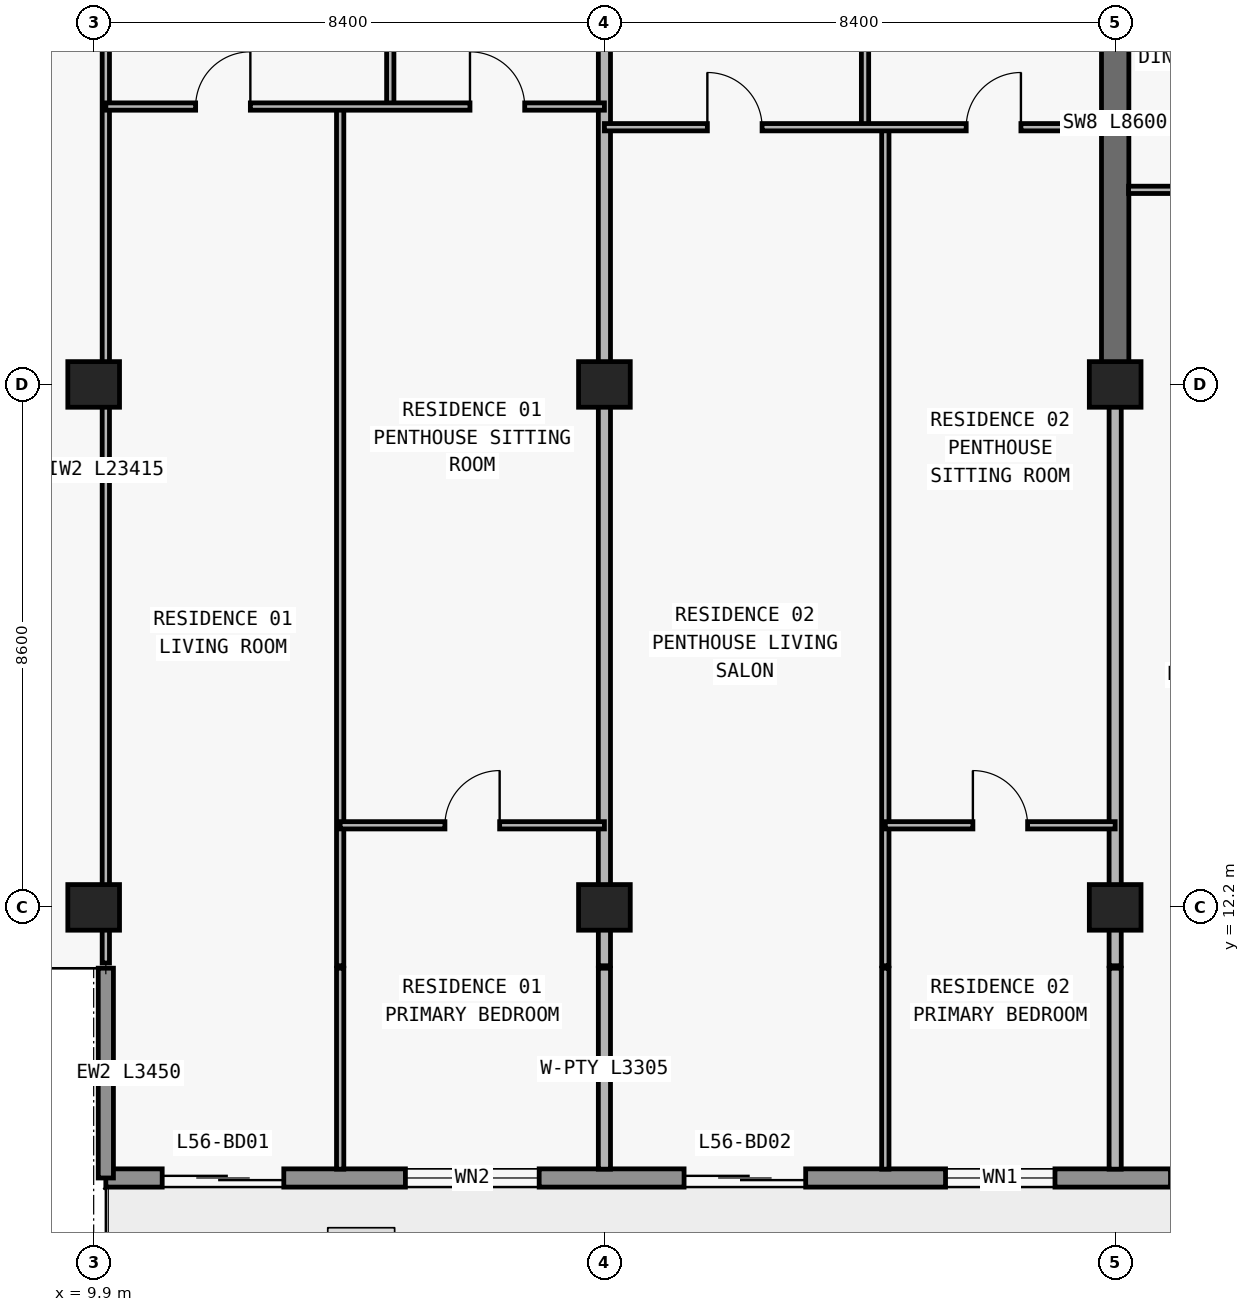
"""IFC4 building model, lengths in metres.
Left out: names, types, materials, properties, quantities, classifications, styles, units other than length and angle.
Written with IfcOpenShell. Run it as: python <this file> out.ifc"""

import sys

from ifc_helpers import new_model, si_unit, direction, frame, frame_2d, origin, origin_2d, place, context, subcontext, project, spatial, rectangle, extrude, element, fill, save


model = new_model("IFC4")
c1 = context("Model", 3, precision=1e-05, world=origin(), true_north=direction((0.0, 1.0)))
c2 = subcontext(c1, "Body", "Model", "MODEL_VIEW")
j1 = project(units=[si_unit("LENGTHUNIT", "METRE"), si_unit("PLANEANGLEUNIT", "RADIAN")], contexts=[c1])
p1 = place(None, origin())
s1 = spatial("IfcSite", under=j1, at=p1, CompositionType="ELEMENT")
p2 = place(p1, origin())
s2 = spatial("IfcBuilding", under=s1, at=p2, CompositionType="ELEMENT")
p3 = place(p2, frame((0.0, 0.0, 201.6)))
s3 = spatial("IfcBuildingStorey", under=s2, at=p3, CompositionType="ELEMENT", Elevation=201.6)
for number, where, z_axis, x_axis in (
    (1, (9.9, 12.2, 0.0), (0.0, 0.0, 1.0), (1.0, 0.0, 0.0)),
    (2, (18.3, 12.2, 0.0), (0.0, 0.0, 1.0), (1.0, 0.0, 0.0)),
    (3, (26.7, 12.2, 0.0), (0.0, 0.0, 1.0), (1.0, 0.0, 0.0)),
    (4, (9.9, 20.8, 0.0), (0.0, 0.0, 1.0), (1.0, 0.0, 0.0)),
    (5, (18.3, 20.8, 0.0), (0.0, 0.0, 1.0), (1.0, 0.0, 0.0)),
    (6, (26.7, 20.8, 0.0), (0.0, 0.0, 1.0), (1.0, 0.0, 0.0)),
):
    element("IfcColumn", number, at=place(p3, frame(where, z_axis=z_axis, x_axis=x_axis)), inside=s3, PredefinedType="COLUMN", context=c2, shape_type="SweptSolid", body=[
        extrude(rectangle(XDim=0.85, YDim=0.75, at=origin_2d()), origin(), (0.0, 0.0, 1.0), 3.05),
    ])
p4 = place(p3, frame((26.7, 20.8, 0.0), z_axis=(0.0, 0.0, 1.0), x_axis=(0.0, 1.0, 0.0)))
e7 = element("IfcWall", 7, at=p4, inside=s3, PredefinedType="SHEAR", context=c2, shape_type="SweptSolid", body=[
    extrude(rectangle(XDim=8.6, YDim=0.45, at=frame_2d((4.3, 0.0))), origin(), (0.0, 0.0, 1.0), 3.05),
])
p5 = place(p3, frame((67.7, 7.75, 0.0), z_axis=(0.0, 0.0, 1.0), x_axis=(-1.0, 0.0, 0.0)))
e8 = element("IfcWall", 8, at=p5, inside=s3, PredefinedType="STANDARD", context=c2, shape_type="SweptSolid", body=[
    extrude(rectangle(XDim=57.6, YDim=0.3, at=frame_2d((28.8, 0.0))), origin(), (0.0, 0.0, 1.0), 3.05),
])
p6 = place(p5, frame((54.673, 0.0, 0.0)))
e9 = element("IfcOpeningElement", 9, at=p6, cuts=e8, PredefinedType="OPENING", context=c2, shape_type="SweptSolid", body=[
    extrude(rectangle(XDim=2.0, YDim=2.3, at=frame_2d((1.0, 1.15))), frame((0.0, 0.16, 0.0), z_axis=(0.0, -1.0, 0.0), x_axis=(1.0, 0.0, 0.0)), (0.0, 0.0, 1.0), 0.32),
])
p7 = place(p5, frame((50.473, 0.0, 0.85)))
e10 = element("IfcOpeningElement", 10, at=p7, cuts=e8, PredefinedType="OPENING", context=c2, shape_type="SweptSolid", body=[
    extrude(rectangle(XDim=2.2, YDim=1.55, at=frame_2d((1.1, 0.775))), frame((0.0, 0.16, 0.0), z_axis=(0.0, -1.0, 0.0), x_axis=(1.0, 0.0, 0.0)), (0.0, 0.0, 1.0), 0.32),
])
p8 = place(p5, frame((46.09, 0.0, 0.0)))
e11 = element("IfcOpeningElement", 11, at=p8, cuts=e8, PredefinedType="OPENING", context=c2, shape_type="SweptSolid", body=[
    extrude(rectangle(XDim=2.0, YDim=2.3, at=frame_2d((1.0, 1.15))), frame((0.0, 0.16, 0.0), z_axis=(0.0, -1.0, 0.0), x_axis=(1.0, 0.0, 0.0)), (0.0, 0.0, 1.0), 0.32),
])
p9 = place(p5, frame((41.99, 0.0, 0.85)))
e12 = element("IfcOpeningElement", 12, at=p9, cuts=e8, PredefinedType="OPENING", context=c2, shape_type="SweptSolid", body=[
    extrude(rectangle(XDim=1.8, YDim=1.55, at=frame_2d((0.9, 0.775))), frame((0.0, 0.16, 0.0), z_axis=(0.0, -1.0, 0.0), x_axis=(1.0, 0.0, 0.0)), (0.0, 0.0, 1.0), 0.32),
])
p10 = place(p5, frame((38.09, 0.0, 0.0)))
e13 = element("IfcOpeningElement", 13, at=p10, cuts=e8, PredefinedType="OPENING", context=c2, shape_type="SweptSolid", body=[
    extrude(rectangle(XDim=2.0, YDim=2.3, at=frame_2d((1.0, 1.15))), frame((0.0, 0.16, 0.0), z_axis=(0.0, -1.0, 0.0), x_axis=(1.0, 0.0, 0.0)), (0.0, 0.0, 1.0), 0.32),
])
p11 = place(p5, frame((33.41, 0.0, 0.65)))
e14 = element("IfcOpeningElement", 14, at=p11, cuts=e8, PredefinedType="OPENING", context=c2, shape_type="SweptSolid", body=[
    extrude(rectangle(XDim=2.6, YDim=1.85, at=frame_2d((1.3, 0.925))), frame((0.0, 0.16, 0.0), z_axis=(0.0, -1.0, 0.0), x_axis=(1.0, 0.0, 0.0)), (0.0, 0.0, 1.0), 0.32),
])
p12 = place(p5, frame((27.7, 0.0, 0.85)))
e15 = element("IfcOpeningElement", 15, at=p12, cuts=e8, PredefinedType="OPENING", context=c2, shape_type="SweptSolid", body=[
    extrude(rectangle(XDim=2.2, YDim=1.55, at=frame_2d((1.1, 0.775))), frame((0.0, 0.16, 0.0), z_axis=(0.0, -1.0, 0.0), x_axis=(1.0, 0.0, 0.0)), (0.0, 0.0, 1.0), 0.32),
])
p13 = place(p5, frame((19.7, 0.0, 0.85)))
e16 = element("IfcOpeningElement", 16, at=p13, cuts=e8, PredefinedType="OPENING", context=c2, shape_type="SweptSolid", body=[
    extrude(rectangle(XDim=2.2, YDim=1.55, at=frame_2d((1.1, 0.775))), frame((0.0, 0.16, 0.0), z_axis=(0.0, -1.0, 0.0), x_axis=(1.0, 0.0, 0.0)), (0.0, 0.0, 1.0), 0.32),
])
p14 = place(p5, frame((13.69, 0.0, 0.0)))
e17 = element("IfcOpeningElement", 17, at=p14, cuts=e8, PredefinedType="OPENING", context=c2, shape_type="SweptSolid", body=[
    extrude(rectangle(XDim=2.0, YDim=2.3, at=frame_2d((1.0, 1.15))), frame((0.0, 0.16, 0.0), z_axis=(0.0, -1.0, 0.0), x_axis=(1.0, 0.0, 0.0)), (0.0, 0.0, 1.0), 0.32),
])
p15 = place(p5, frame((9.01, 0.0, 0.65)))
e18 = element("IfcOpeningElement", 18, at=p15, cuts=e8, PredefinedType="OPENING", context=c2, shape_type="SweptSolid", body=[
    extrude(rectangle(XDim=2.6, YDim=1.85, at=frame_2d((1.3, 0.925))), frame((0.0, 0.16, 0.0), z_axis=(0.0, -1.0, 0.0), x_axis=(1.0, 0.0, 0.0)), (0.0, 0.0, 1.0), 0.32),
])
p16 = place(p5, frame((3.0, 0.0, 0.85)))
e19 = element("IfcOpeningElement", 19, at=p16, cuts=e8, PredefinedType="OPENING", context=c2, shape_type="SweptSolid", body=[
    extrude(rectangle(XDim=2.2, YDim=1.55, at=frame_2d((1.1, 0.775))), frame((0.0, 0.16, 0.0), z_axis=(0.0, -1.0, 0.0), x_axis=(1.0, 0.0, 0.0)), (0.0, 0.0, 1.0), 0.32),
])
p17 = place(p3, frame((10.1, 11.2, 0.0), z_axis=(0.0, 0.0, 1.0), x_axis=(0.0, -1.0, 0.0)))
e20 = element("IfcWall", 20, at=p17, inside=s3, PredefinedType="ELEMENTEDWALL", context=c2, shape_type="SweptSolid", body=[
    extrude(rectangle(XDim=3.45, YDim=0.25, at=frame_2d((1.725, 0.0))), origin(), (0.0, 0.0, 1.0), 3.05),
])
p18 = place(p3, frame((10.1, 11.285, 0.0), z_axis=(0.0, 0.0, 1.0), x_axis=(0.0, 1.0, 0.0)))
e21 = element("IfcWall", 21, at=p18, inside=s3, PredefinedType="PARTITIONING", context=c2, shape_type="SweptSolid", body=[
    extrude(rectangle(XDim=23.415, YDim=0.12, at=frame_2d((11.708, 0.0))), origin(), (0.0, 0.0, 1.0), 2.263),
])
p19 = place(p18, frame((16.21, 0.0, 0.0)))
e22 = element("IfcOpeningElement", 22, at=p19, cuts=e21, PredefinedType="OPENING", context=c2, shape_type="SweptSolid", body=[
    extrude(rectangle(XDim=0.9, YDim=2.15, at=frame_2d((0.45, 1.075))), frame((0.0, 0.07, 0.0), z_axis=(0.0, -1.0, 0.0), x_axis=(1.0, 0.0, 0.0)), (0.0, 0.0, 1.0), 0.14),
])
p20 = place(p3, frame((13.954, 7.895, 0.0), z_axis=(0.0, 0.0, 1.0), x_axis=(0.0, 1.0, 0.0)))
e23 = element("IfcWall", 23, at=p20, inside=s3, PredefinedType="PARTITIONING", context=c2, shape_type="SweptSolid", body=[
    extrude(rectangle(XDim=3.305, YDim=0.12, at=frame_2d((1.652, 0.0))), origin(), (0.0, 0.0, 1.0), 3.05),
])
p21 = place(p3, frame((13.954, 11.24, 0.0), z_axis=(0.0, 0.0, 1.0), x_axis=(0.0, 1.0, 0.0)))
e24 = element("IfcWall", 24, at=p21, inside=s3, PredefinedType="PARTITIONING", context=c2, shape_type="SweptSolid", body=[
    extrude(rectangle(XDim=14.13, YDim=0.12, at=frame_2d((7.065, 0.0))), origin(), (0.0, 0.0, 1.0), 3.05),
])
p22 = place(p3, frame((14.778, 25.37, 0.0), z_axis=(0.0, 0.0, 1.0), x_axis=(0.0, 1.0, 0.0)))
e25 = element("IfcWall", 25, at=p22, inside=s3, PredefinedType="PARTITIONING", context=c2, shape_type="SweptSolid", body=[
    extrude(rectangle(XDim=5.15, YDim=0.12, at=frame_2d((2.575, 0.0))), origin(), (0.0, 0.0, 1.0), 3.05),
])
p23 = place(p22, frame((2.125, 0.0, 0.0)))
e26 = element("IfcOpeningElement", 26, at=p23, cuts=e25, PredefinedType="OPENING", context=c2, shape_type="SweptSolid", body=[
    extrude(rectangle(XDim=0.9, YDim=2.15, at=frame_2d((0.45, 1.075))), frame((0.0, 0.07, 0.0), z_axis=(0.0, -1.0, 0.0), x_axis=(1.0, 0.0, 0.0)), (0.0, 0.0, 1.0), 0.14),
])
p24 = place(p3, frame((18.3, 7.895, 0.0), z_axis=(0.0, 0.0, 1.0), x_axis=(0.0, 1.0, 0.0)))
e27 = element("IfcWall", 27, at=p24, inside=s3, PredefinedType="PARTITIONING", context=c2, shape_type="SweptSolid", body=[
    extrude(rectangle(XDim=3.305, YDim=0.2, at=frame_2d((1.652, 0.0))), origin(), (0.0, 0.0, 1.0), 3.05),
])
p25 = place(p3, frame((18.3, 11.24, 0.0), z_axis=(0.0, 0.0, 1.0), x_axis=(0.0, 1.0, 0.0)))
e28 = element("IfcWall", 28, at=p25, inside=s3, PredefinedType="PARTITIONING", context=c2, shape_type="SweptSolid", body=[
    extrude(rectangle(XDim=23.46, YDim=0.2, at=frame_2d((11.73, 0.0))), origin(), (0.0, 0.0, 1.0), 2.263),
])
p26 = place(p3, frame((22.586, 25.03, 0.0), z_axis=(0.0, 0.0, 1.0), x_axis=(0.0, 1.0, 0.0)))
e29 = element("IfcWall", 29, at=p26, inside=s3, PredefinedType="PARTITIONING", context=c2, shape_type="SweptSolid", body=[
    extrude(rectangle(XDim=5.15, YDim=0.12, at=frame_2d((2.575, 0.0))), origin(), (0.0, 0.0, 1.0), 2.725),
])
p27 = place(p26, frame((2.125, 0.0, 0.0)))
e30 = element("IfcOpeningElement", 30, at=p27, cuts=e29, PredefinedType="OPENING", context=c2, shape_type="SweptSolid", body=[
    extrude(rectangle(XDim=0.9, YDim=2.15, at=frame_2d((0.45, 1.075))), frame((0.0, 0.07, 0.0), z_axis=(0.0, -1.0, 0.0), x_axis=(1.0, 0.0, 0.0)), (0.0, 0.0, 1.0), 0.14),
])
p28 = place(p3, frame((22.92, 7.895, 0.0), z_axis=(0.0, 0.0, 1.0), x_axis=(0.0, 1.0, 0.0)))
e31 = element("IfcWall", 31, at=p28, inside=s3, PredefinedType="PARTITIONING", context=c2, shape_type="SweptSolid", body=[
    extrude(rectangle(XDim=3.305, YDim=0.12, at=frame_2d((1.652, 0.0))), origin(), (0.0, 0.0, 1.0), 3.05),
])
p29 = place(p3, frame((22.92, 11.24, 0.0), z_axis=(0.0, 0.0, 1.0), x_axis=(0.0, 1.0, 0.0)))
e32 = element("IfcWall", 32, at=p29, inside=s3, PredefinedType="PARTITIONING", context=c2, shape_type="SweptSolid", body=[
    extrude(rectangle(XDim=13.79, YDim=0.12, at=frame_2d((6.895, 0.0))), origin(), (0.0, 0.0, 1.0), 3.05),
])
p30 = place(p3, frame((26.7, 7.895, 0.0), z_axis=(0.0, 0.0, 1.0), x_axis=(0.0, 1.0, 0.0)))
e33 = element("IfcWall", 33, at=p30, inside=s3, PredefinedType="PARTITIONING", context=c2, shape_type="SweptSolid", body=[
    extrude(rectangle(XDim=3.305, YDim=0.2, at=frame_2d((1.652, 0.0))), origin(), (0.0, 0.0, 1.0), 3.05),
])
p31 = place(p3, frame((26.7, 11.24, 0.0), z_axis=(0.0, 0.0, 1.0), x_axis=(0.0, 1.0, 0.0)))
e34 = element("IfcWall", 34, at=p31, inside=s3, PredefinedType="PARTITIONING", context=c2, shape_type="SweptSolid", body=[
    extrude(rectangle(XDim=9.555, YDim=0.2, at=frame_2d((4.777, 0.0))), origin(), (0.0, 0.0, 1.0), 2.263),
])
p32 = place(p3, frame((13.954, 13.55, 0.0), z_axis=(0.0, 0.0, 1.0), x_axis=(1.0, 0.0, 0.0)))
e35 = element("IfcWall", 35, at=p32, inside=s3, PredefinedType="PARTITIONING", context=c2, shape_type="SweptSolid", body=[
    extrude(rectangle(XDim=4.346, YDim=0.12, at=frame_2d((2.173, 0.0))), origin(), (0.0, 0.0, 1.0), 3.05),
])
p33 = place(p32, frame((1.723, 0.0, 0.0)))
e36 = element("IfcOpeningElement", 36, at=p33, cuts=e35, PredefinedType="OPENING", context=c2, shape_type="SweptSolid", body=[
    extrude(rectangle(XDim=0.9, YDim=2.15, at=frame_2d((0.45, 1.075))), frame((0.0, 0.07, 0.0), z_axis=(0.0, -1.0, 0.0), x_axis=(1.0, 0.0, 0.0)), (0.0, 0.0, 1.0), 0.14),
])
p34 = place(p3, frame((22.92, 13.55, 0.0), z_axis=(0.0, 0.0, 1.0), x_axis=(1.0, 0.0, 0.0)))
e37 = element("IfcWall", 37, at=p34, inside=s3, PredefinedType="PARTITIONING", context=c2, shape_type="SweptSolid", body=[
    extrude(rectangle(XDim=3.78, YDim=0.12, at=frame_2d((1.89, 0.0))), origin(), (0.0, 0.0, 1.0), 3.05),
])
p35 = place(p34, frame((1.44, 0.0, 0.0)))
e38 = element("IfcOpeningElement", 38, at=p35, cuts=e37, PredefinedType="OPENING", context=c2, shape_type="SweptSolid", body=[
    extrude(rectangle(XDim=0.9, YDim=2.15, at=frame_2d((0.45, 1.075))), frame((0.0, 0.07, 0.0), z_axis=(0.0, -1.0, 0.0), x_axis=(1.0, 0.0, 0.0)), (0.0, 0.0, 1.0), 0.14),
])
p36 = place(p3, frame((26.92, 24.0, 0.0), z_axis=(0.0, 0.0, 1.0), x_axis=(1.0, 0.0, 0.0)))
e39 = element("IfcWall", 39, at=p36, inside=s3, PredefinedType="PARTITIONING", context=c2, shape_type="SweptSolid", body=[
    extrude(rectangle(XDim=8.18, YDim=0.12, at=frame_2d((4.09, 0.0))), origin(), (0.0, 0.0, 1.0), 3.05),
])
p37 = place(p36, frame((1.33, 0.0, 0.0)))
e40 = element("IfcOpeningElement", 40, at=p37, cuts=e39, PredefinedType="OPENING", context=c2, shape_type="SweptSolid", body=[
    extrude(rectangle(XDim=0.9, YDim=2.15, at=frame_2d((0.45, 1.075))), frame((0.0, 0.07, 0.0), z_axis=(0.0, -1.0, 0.0), x_axis=(1.0, 0.0, 0.0)), (0.0, 0.0, 1.0), 0.14),
])
p38 = place(p3, frame((18.3, 25.03, 0.0), z_axis=(0.0, 0.0, 1.0), x_axis=(1.0, 0.0, 0.0)))
e41 = element("IfcWall", 41, at=p38, inside=s3, PredefinedType="PARTITIONING", context=c2, shape_type="SweptSolid", body=[
    extrude(rectangle(XDim=8.18, YDim=0.12, at=frame_2d((4.09, 0.0))), origin(), (0.0, 0.0, 1.0), 3.05),
])
p39 = place(p38, frame((1.693, 0.0, 0.0)))
e42 = element("IfcOpeningElement", 42, at=p39, cuts=e41, PredefinedType="OPENING", context=c2, shape_type="SweptSolid", body=[
    extrude(rectangle(XDim=0.9, YDim=2.15, at=frame_2d((0.45, 1.075))), frame((0.0, 0.07, 0.0), z_axis=(0.0, -1.0, 0.0), x_axis=(1.0, 0.0, 0.0)), (0.0, 0.0, 1.0), 0.14),
])
p40 = place(p38, frame((5.95, 0.0, 0.0)))
e43 = element("IfcOpeningElement", 43, at=p40, cuts=e41, PredefinedType="OPENING", context=c2, shape_type="SweptSolid", body=[
    extrude(rectangle(XDim=0.9, YDim=2.15, at=frame_2d((0.45, 1.075))), frame((0.0, 0.07, 0.0), z_axis=(0.0, -1.0, 0.0), x_axis=(1.0, 0.0, 0.0)), (0.0, 0.0, 1.0), 0.14),
])
p41 = place(p3, frame((10.1, 25.37, 0.0), z_axis=(0.0, 0.0, 1.0), x_axis=(1.0, 0.0, 0.0)))
e44 = element("IfcWall", 44, at=p41, inside=s3, PredefinedType="PARTITIONING", context=c2, shape_type="SweptSolid", body=[
    extrude(rectangle(XDim=8.2, YDim=0.12, at=frame_2d((4.1, 0.0))), origin(), (0.0, 0.0, 1.0), 3.05),
])
p42 = place(p41, frame((1.477, 0.0, 0.0)))
e45 = element("IfcOpeningElement", 45, at=p42, cuts=e44, PredefinedType="OPENING", context=c2, shape_type="SweptSolid", body=[
    extrude(rectangle(XDim=0.9, YDim=2.15, at=frame_2d((0.45, 1.075))), frame((0.0, 0.07, 0.0), z_axis=(0.0, -1.0, 0.0), x_axis=(1.0, 0.0, 0.0)), (0.0, 0.0, 1.0), 0.14),
])
p43 = place(p41, frame((5.989, 0.0, 0.0)))
e46 = element("IfcOpeningElement", 46, at=p43, cuts=e44, PredefinedType="OPENING", context=c2, shape_type="SweptSolid", body=[
    extrude(rectangle(XDim=0.9, YDim=2.15, at=frame_2d((0.45, 1.075))), frame((0.0, 0.07, 0.0), z_axis=(0.0, -1.0, 0.0), x_axis=(1.0, 0.0, 0.0)), (0.0, 0.0, 1.0), 0.14),
])
p44 = place(p6, origin())
e47 = element("IfcDoor", 47, at=p44, inside=s3, OperationType="DOUBLE_DOOR_SLIDING", PredefinedType="DOOR", context=c2, shape_type="SweptSolid", body=[
    extrude(rectangle(XDim=2.0, YDim=2.3, at=frame_2d((1.0, 1.15))), frame((0.0, 0.025, 0.0), z_axis=(0.0, -1.0, 0.0), x_axis=(1.0, 0.0, 0.0)), (0.0, 0.0, 1.0), 0.05),
])
fill(e9, e47)
p45 = place(p7, origin())
e48 = element("IfcWindow", 48, at=p45, inside=s3, PartitioningType="SINGLE_PANEL", PredefinedType="WINDOW", context=c2, shape_type="SweptSolid", body=[
    extrude(rectangle(XDim=2.2, YDim=1.55, at=frame_2d((1.1, 0.775))), frame((0.0, 0.03, 0.0), z_axis=(0.0, -1.0, 0.0), x_axis=(1.0, 0.0, 0.0)), (0.0, 0.0, 1.0), 0.06),
])
fill(e10, e48)
p46 = place(p8, origin())
e49 = element("IfcDoor", 49, at=p46, inside=s3, OperationType="DOUBLE_DOOR_SLIDING", PredefinedType="DOOR", context=c2, shape_type="SweptSolid", body=[
    extrude(rectangle(XDim=2.0, YDim=2.3, at=frame_2d((1.0, 1.15))), frame((0.0, 0.025, 0.0), z_axis=(0.0, -1.0, 0.0), x_axis=(1.0, 0.0, 0.0)), (0.0, 0.0, 1.0), 0.05),
])
fill(e11, e49)
p47 = place(p9, origin())
e50 = element("IfcWindow", 50, at=p47, inside=s3, PartitioningType="SINGLE_PANEL", PredefinedType="WINDOW", context=c2, shape_type="SweptSolid", body=[
    extrude(rectangle(XDim=1.8, YDim=1.55, at=frame_2d((0.9, 0.775))), frame((0.0, 0.03, 0.0), z_axis=(0.0, -1.0, 0.0), x_axis=(1.0, 0.0, 0.0)), (0.0, 0.0, 1.0), 0.06),
])
fill(e12, e50)
p48 = place(p42, origin())
e51 = element("IfcDoor", 51, at=p48, inside=s3, OperationType="SINGLE_SWING_RIGHT", PredefinedType="DOOR", context=c2, shape_type="SweptSolid", body=[
    extrude(rectangle(XDim=0.9, YDim=2.15, at=frame_2d((0.45, 1.075))), frame((0.0, 0.025, 0.0), z_axis=(0.0, -1.0, 0.0), x_axis=(1.0, 0.0, 0.0)), (0.0, 0.0, 1.0), 0.05),
])
fill(e45, e51)
p49 = place(p43, origin())
e52 = element("IfcDoor", 52, at=p49, inside=s3, OperationType="SINGLE_SWING_LEFT", PredefinedType="DOOR", context=c2, shape_type="SweptSolid", body=[
    extrude(rectangle(XDim=0.9, YDim=2.15, at=frame_2d((0.45, 1.075))), frame((0.0, 0.025, 0.0), z_axis=(0.0, -1.0, 0.0), x_axis=(1.0, 0.0, 0.0)), (0.0, 0.0, 1.0), 0.05),
])
fill(e46, e52)
p50 = place(p33, origin())
e53 = element("IfcDoor", 53, at=p50, inside=s3, OperationType="SINGLE_SWING_RIGHT", PredefinedType="DOOR", context=c2, shape_type="SweptSolid", body=[
    extrude(rectangle(XDim=0.9, YDim=2.15, at=frame_2d((0.45, 1.075))), frame((0.0, 0.025, 0.0), z_axis=(0.0, -1.0, 0.0), x_axis=(1.0, 0.0, 0.0)), (0.0, 0.0, 1.0), 0.05),
])
fill(e36, e53)
p51 = place(p39, origin())
e54 = element("IfcDoor", 54, at=p51, inside=s3, OperationType="SINGLE_SWING_LEFT", PredefinedType="DOOR", context=c2, shape_type="SweptSolid", body=[
    extrude(rectangle(XDim=0.9, YDim=2.15, at=frame_2d((0.45, 1.075))), frame((0.0, 0.025, 0.0), z_axis=(0.0, -1.0, 0.0), x_axis=(1.0, 0.0, 0.0)), (0.0, 0.0, 1.0), 0.05),
])
fill(e42, e54)
p52 = place(p40, origin())
e55 = element("IfcDoor", 55, at=p52, inside=s3, OperationType="SINGLE_SWING_RIGHT", PredefinedType="DOOR", context=c2, shape_type="SweptSolid", body=[
    extrude(rectangle(XDim=0.9, YDim=2.15, at=frame_2d((0.45, 1.075))), frame((0.0, 0.025, 0.0), z_axis=(0.0, -1.0, 0.0), x_axis=(1.0, 0.0, 0.0)), (0.0, 0.0, 1.0), 0.05),
])
fill(e43, e55)
p53 = place(p35, origin())
e56 = element("IfcDoor", 56, at=p53, inside=s3, OperationType="SINGLE_SWING_LEFT", PredefinedType="DOOR", context=c2, shape_type="SweptSolid", body=[
    extrude(rectangle(XDim=0.9, YDim=2.15, at=frame_2d((0.45, 1.075))), frame((0.0, 0.025, 0.0), z_axis=(0.0, -1.0, 0.0), x_axis=(1.0, 0.0, 0.0)), (0.0, 0.0, 1.0), 0.05),
])
fill(e38, e56)
save(model, sys.argv[1])
